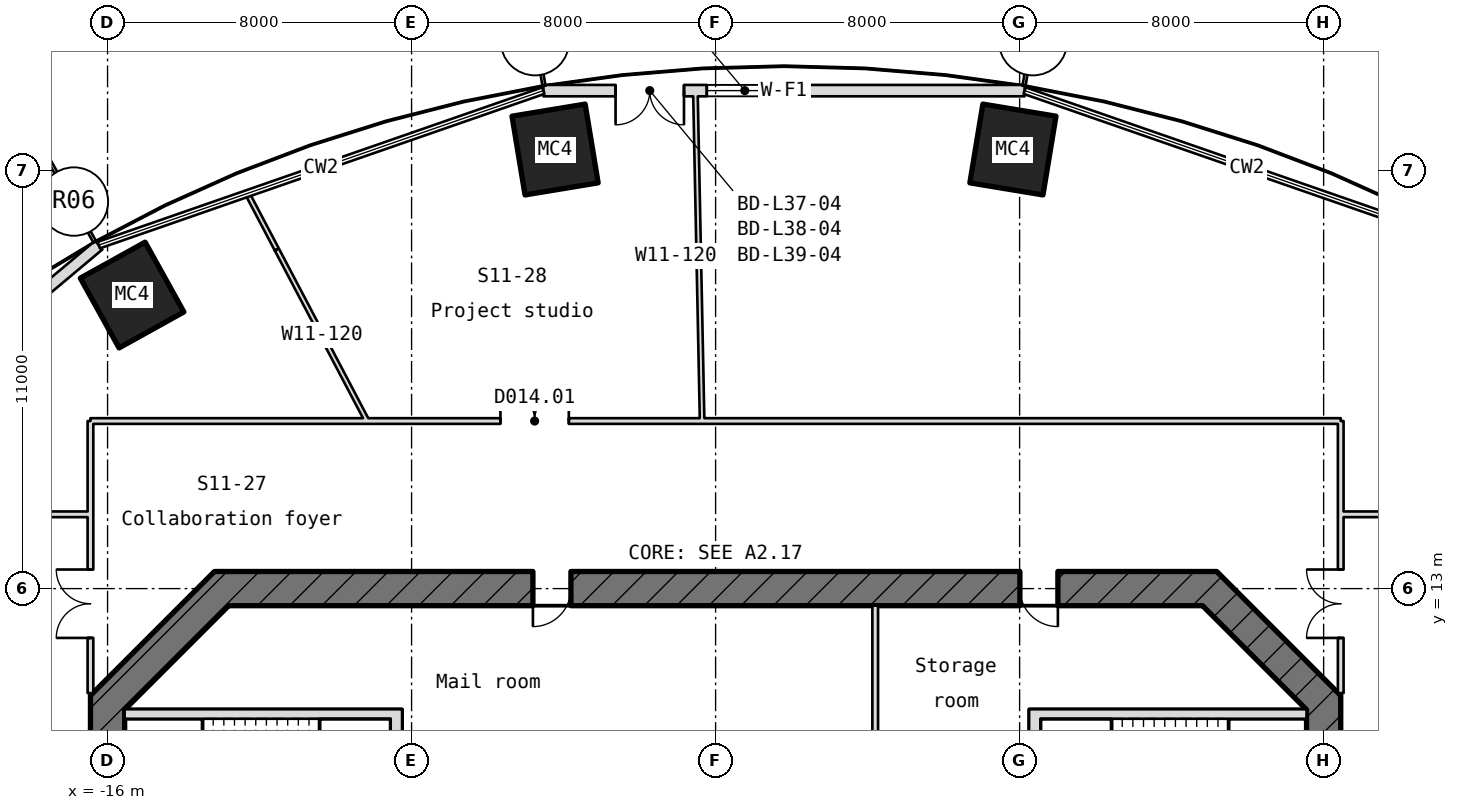
"""IFC4 building model, lengths in metres.
Left out: names, types, materials, properties, quantities, classifications, styles, units other than length and angle.
Written with IfcOpenShell. Run it as: python <this file> out.ifc"""

import sys

from ifc_helpers import new_model, si_unit, direction, frame, frame_2d, origin, origin_2d, place, context, subcontext, project, spatial, rectangle, hollow_rectangle, extrude, element, fill, save


model = new_model("IFC4")
c1 = context("Model", 3, precision=1e-05, world=origin(), true_north=direction((0.0, 1.0)))
c2 = subcontext(c1, "Body", "Model", "MODEL_VIEW")
j1 = project(units=[si_unit("LENGTHUNIT", "METRE"), si_unit("PLANEANGLEUNIT", "RADIAN")], contexts=[c1])
p1 = place(None, origin())
s1 = spatial("IfcSite", under=j1, at=p1, CompositionType="ELEMENT")
p2 = place(p1, origin())
s2 = spatial("IfcBuilding", under=s1, at=p2, CompositionType="ELEMENT")
p3 = place(p2, frame((0.0, 0.0, 173.5)))
s3 = spatial("IfcBuildingStorey", under=s2, at=p3, CompositionType="ELEMENT", Elevation=173.5)
for number, where, z_axis, x_axis in (
    (1, (7.824, 24.553, -0.18), (0.0, 0.0, 1.0), (0.987, -0.163, 0.0)),
    (2, (-4.224, 24.553, -0.18), (0.0, 0.0, 1.0), (0.987, 0.163, 0.0)),
    (3, (-15.354, 20.724, -0.18), (0.0, 0.0, 1.0), (0.874, 0.485, 0.0)),
):
    element("IfcColumn", number, at=place(p3, frame(where, z_axis=z_axis, x_axis=x_axis)), inside=s3, PredefinedType="COLUMN", context=c2, shape_type="SweptSolid", body=[
        extrude(hollow_rectangle(XDim=1.95, YDim=2.1, WallThickness=0.075, at=origin_2d()), origin(), (0.0, 0.0, 1.0), 4.15),
    ])
p4 = place(p3, frame((8.132, 26.103, 0.0), z_axis=(0.0, 0.0, 1.0), x_axis=(-1.0, 0.0, 0.0)))
e4 = element("IfcWall", 4, at=p4, inside=s3, PredefinedType="SOLIDWALL", context=c2, shape_type="SweptSolid", body=[
    extrude(rectangle(XDim=12.664, YDim=0.3, at=frame_2d((6.332, 0.0))), origin(), (0.0, 0.0, 1.0), 3.97),
])
p5 = place(p4, frame((8.964, 0.0, 0.0)))
e5 = element("IfcOpeningElement", 5, at=p5, cuts=e4, PredefinedType="OPENING", context=c2, shape_type="SweptSolid", body=[
    extrude(rectangle(XDim=1.8, YDim=2.4, at=frame_2d((0.9, 1.2))), frame((0.0, 0.16, 0.0), z_axis=(0.0, -1.0, 0.0), x_axis=(1.0, 0.0, 0.0)), (0.0, 0.0, 1.0), 0.32),
])
p6 = place(p4, frame((6.364, 0.0, 0.9)))
e6 = element("IfcOpeningElement", 6, at=p6, cuts=e4, PredefinedType="OPENING", context=c2, shape_type="SweptSolid", body=[
    extrude(rectangle(XDim=2.0, YDim=1.5, at=frame_2d((1.0, 0.75))), frame((0.0, 0.16, 0.0), z_axis=(0.0, -1.0, 0.0), x_axis=(1.0, 0.0, 0.0)), (0.0, 0.0, 1.0), 0.32),
])
p7 = place(p3, frame((-16.232, 22.038, 0.0), z_axis=(0.0, 0.0, 1.0), x_axis=(-0.766150735347, -0.642660914268, 0.0)))
e7 = element("IfcWall", 7, at=p7, inside=s3, PredefinedType="SOLIDWALL", context=c2, shape_type="SweptSolid", body=[
    extrude(rectangle(XDim=11.688, YDim=0.3, at=frame_2d((5.844, 0.0))), origin(), (0.0, 0.0, 1.0), 3.97),
])
p8 = place(p7, frame((7.988, 0.0, 0.0)))
e8 = element("IfcOpeningElement", 8, at=p8, cuts=e7, PredefinedType="OPENING", context=c2, shape_type="SweptSolid", body=[
    extrude(rectangle(XDim=1.8, YDim=2.4, at=frame_2d((0.9, 1.2))), frame((0.0, 0.16, 0.0), z_axis=(0.0, -1.0, 0.0), x_axis=(1.0, 0.0, 0.0)), (0.0, 0.0, 1.0), 0.32),
])
p9 = place(p7, frame((5.388, 0.0, 0.9)))
e9 = element("IfcOpeningElement", 9, at=p9, cuts=e7, PredefinedType="OPENING", context=c2, shape_type="SweptSolid", body=[
    extrude(rectangle(XDim=2.0, YDim=1.5, at=frame_2d((1.0, 0.75))), frame((0.0, 0.16, 0.0), z_axis=(0.0, -1.0, 0.0), x_axis=(1.0, 0.0, 0.0)), (0.0, 0.0, 1.0), 0.32),
])
p10 = place(p3, frame((16.0, -10.186, -0.18), z_axis=(0.0, 0.0, 1.0), x_axis=(0.0, 1.0, 0.0)))
e10 = element("IfcWall", 10, at=p10, inside=s3, PredefinedType="SHEAR", context=c2, shape_type="SweptSolid", body=[
    extrude(rectangle(XDim=20.373, YDim=0.9, at=frame_2d((10.186, 0.0))), origin(), (0.0, 0.0, 1.0), 4.15),
])
p11 = place(p10, frame((8.986, 0.0, 0.18)))
e11 = element("IfcOpeningElement", 11, at=p11, cuts=e10, PredefinedType="OPENING", context=c2, shape_type="SweptSolid", body=[
    extrude(rectangle(XDim=2.4, YDim=2.1, at=frame_2d((1.2, 1.05))), frame((0.0, 0.46, 0.0), z_axis=(0.0, -1.0, 0.0), x_axis=(1.0, 0.0, 0.0)), (0.0, 0.0, 1.0), 0.92),
])
p12 = place(p10, frame((13.586, 0.0, 0.18)))
e12 = element("IfcOpeningElement", 12, at=p12, cuts=e10, PredefinedType="OPENING", context=c2, shape_type="SweptSolid", body=[
    extrude(rectangle(XDim=1.2, YDim=2.1, at=frame_2d((0.6, 1.05))), frame((0.0, 0.46, 0.0), z_axis=(0.0, -1.0, 0.0), x_axis=(1.0, 0.0, 0.0)), (0.0, 0.0, 1.0), 0.92),
])
p13 = place(p10, frame((2.4, 0.0, 0.18)))
e13 = element("IfcOpeningElement", 13, at=p13, cuts=e10, PredefinedType="OPENING", context=c2, shape_type="SweptSolid", body=[
    extrude(rectangle(XDim=1.2, YDim=2.1, at=frame_2d((0.6, 1.05))), frame((0.0, 0.46, 0.0), z_axis=(0.0, -1.0, 0.0), x_axis=(1.0, 0.0, 0.0)), (0.0, 0.0, 1.0), 0.92),
])
p14 = place(p3, frame((16.132, 9.868, -0.18), z_axis=(0.0, 0.0, 1.0), x_axis=(-0.707106781187, 0.707106781187, 0.0)))
e14 = element("IfcWall", 14, at=p14, inside=s3, PredefinedType="SHEAR", context=c2, shape_type="SweptSolid", body=[
    extrude(rectangle(XDim=4.615, YDim=0.9, at=frame_2d((2.308, 0.0))), origin(), (0.0, 0.0, 1.0), 4.15),
])
p15 = place(p3, frame((13.186, 13.0, -0.18), z_axis=(0.0, 0.0, 1.0), x_axis=(-1.0, 0.0, 0.0)))
e15 = element("IfcWall", 15, at=p15, inside=s3, PredefinedType="SHEAR", context=c2, shape_type="SweptSolid", body=[
    extrude(rectangle(XDim=26.373, YDim=0.9, at=frame_2d((13.186, 0.0))), origin(), (0.0, 0.0, 1.0), 4.15),
])
p16 = place(p15, frame((16.993, 0.0, 0.18)))
e16 = element("IfcOpeningElement", 16, at=p16, cuts=e15, PredefinedType="OPENING", context=c2, shape_type="SweptSolid", body=[
    extrude(rectangle(XDim=1.0, YDim=2.1, at=frame_2d((0.5, 1.05))), frame((0.0, 0.46, 0.0), z_axis=(0.0, -1.0, 0.0), x_axis=(1.0, 0.0, 0.0)), (0.0, 0.0, 1.0), 0.92),
])
p17 = place(p15, frame((4.179, 0.0, 0.18)))
e17 = element("IfcOpeningElement", 17, at=p17, cuts=e15, PredefinedType="OPENING", context=c2, shape_type="SweptSolid", body=[
    extrude(rectangle(XDim=1.0, YDim=2.1, at=frame_2d((0.5, 1.05))), frame((0.0, 0.46, 0.0), z_axis=(0.0, -1.0, 0.0), x_axis=(1.0, 0.0, 0.0)), (0.0, 0.0, 1.0), 0.92),
])
p18 = place(p3, frame((-12.868, 13.132, -0.18), z_axis=(0.0, 0.0, 1.0), x_axis=(-0.707106781187, -0.707106781187, 0.0)))
e18 = element("IfcWall", 18, at=p18, inside=s3, PredefinedType="SHEAR", context=c2, shape_type="SweptSolid", body=[
    extrude(rectangle(XDim=4.615, YDim=0.9, at=frame_2d((2.308, 0.0))), origin(), (0.0, 0.0, 1.0), 4.15),
])
p19 = place(p3, frame((-16.0, 10.186, -0.18), z_axis=(0.0, 0.0, 1.0), x_axis=(0.0, -1.0, 0.0)))
e19 = element("IfcWall", 19, at=p19, inside=s3, PredefinedType="SHEAR", context=c2, shape_type="SweptSolid", body=[
    extrude(rectangle(XDim=20.373, YDim=0.9, at=frame_2d((10.186, 0.0))), origin(), (0.0, 0.0, 1.0), 4.15),
])
p20 = place(p19, frame((8.986, 0.0, 0.18)))
e20 = element("IfcOpeningElement", 20, at=p20, cuts=e19, PredefinedType="OPENING", context=c2, shape_type="SweptSolid", body=[
    extrude(rectangle(XDim=2.4, YDim=2.1, at=frame_2d((1.2, 1.05))), frame((0.0, 0.46, 0.0), z_axis=(0.0, -1.0, 0.0), x_axis=(1.0, 0.0, 0.0)), (0.0, 0.0, 1.0), 0.92),
])
p21 = place(p19, frame((5.586, 0.0, 0.18)))
e21 = element("IfcOpeningElement", 21, at=p21, cuts=e19, PredefinedType="OPENING", context=c2, shape_type="SweptSolid", body=[
    extrude(rectangle(XDim=1.2, YDim=2.1, at=frame_2d((0.6, 1.05))), frame((0.0, 0.46, 0.0), z_axis=(0.0, -1.0, 0.0), x_axis=(1.0, 0.0, 0.0)), (0.0, 0.0, 1.0), 0.92),
])
for number, where, z_axis, x_axis in (
    (22, (-15.55, 9.7, -0.18), (0.0, 0.0, 1.0), (1.0, 0.0, 0.0)),
    (23, (8.55, 9.7, -0.18), (0.0, 0.0, 1.0), (1.0, 0.0, 0.0)),
):
    element("IfcWall", number, at=place(p3, frame(where, z_axis=z_axis, x_axis=x_axis)), inside=s3, PredefinedType="SHEAR", context=c2, shape_type="SweptSolid", body=[
        extrude(rectangle(XDim=7.0, YDim=0.25, at=frame_2d((3.5, 0.0))), origin(), (0.0, 0.0, 1.0), 4.15),
    ])
p22 = place(p3, frame((-8.4, 8.35, -0.18), z_axis=(0.0, 0.0, 1.0), x_axis=(0.0, 1.0, 0.0)))
e24 = element("IfcWall", 24, at=p22, inside=s3, PredefinedType="SHEAR", context=c2, shape_type="SweptSolid", body=[
    extrude(rectangle(XDim=1.475, YDim=0.3, at=frame_2d((0.737, 0.0))), origin(), (0.0, 0.0, 1.0), 4.15),
])
p23 = place(p3, frame((4.2, 8.46, 0.0), z_axis=(0.0, 0.0, 1.0), x_axis=(0.0, 1.0, 0.0)))
e25 = element("IfcWall", 25, at=p23, inside=s3, PredefinedType="PARTITIONING", context=c2, shape_type="SweptSolid", body=[
    extrude(rectangle(XDim=4.09, YDim=0.15, at=frame_2d((2.045, 0.0))), origin(), (0.0, 0.0, 1.0), 3.97),
])
p24 = place(p3, frame((8.4, 8.35, -0.18), z_axis=(0.0, 0.0, 1.0), x_axis=(0.0, 1.0, 0.0)))
e26 = element("IfcWall", 26, at=p24, inside=s3, PredefinedType="SHEAR", context=c2, shape_type="SweptSolid", body=[
    extrude(rectangle(XDim=1.475, YDim=0.3, at=frame_2d((0.737, 0.0))), origin(), (0.0, 0.0, 1.0), 4.15),
])
p25 = place(p3, frame((-19.15, 14.955, 0.0), z_axis=(0.0, 0.0, 1.0), x_axis=(1.0, 0.0, 0.0)))
e27 = element("IfcWall", 27, at=p25, inside=s3, PredefinedType="PARTITIONING", context=c2, shape_type="SweptSolid", body=[
    extrude(rectangle(XDim=2.7, YDim=0.15, at=frame_2d((1.35, 0.0))), origin(), (0.0, 0.0, 1.0), 3.97),
])
p26 = place(p3, frame((-16.45, 10.25, 0.0), z_axis=(0.0, 0.0, 1.0), x_axis=(0.0, 1.0, 0.0)))
e28 = element("IfcWall", 28, at=p26, inside=s3, PredefinedType="PARTITIONING", context=c2, shape_type="SweptSolid", body=[
    extrude(rectangle(XDim=7.159, YDim=0.15, at=frame_2d((3.58, 0.0))), origin(), (0.0, 0.0, 1.0), 3.97),
])
p27 = place(p26, frame((1.452, 0.0, 0.0)))
e29 = element("IfcOpeningElement", 29, at=p27, cuts=e28, PredefinedType="OPENING", context=c2, shape_type="SweptSolid", body=[
    extrude(rectangle(XDim=1.8, YDim=2.1, at=frame_2d((0.9, 1.05))), frame((0.0, 0.085, 0.0), z_axis=(0.0, -1.0, 0.0), x_axis=(1.0, 0.0, 0.0)), (0.0, 0.0, 1.0), 0.17),
])
p28 = place(p3, frame((-16.45, 17.409, 0.0), z_axis=(0.0, 0.0, 1.0), x_axis=(1.0, 0.0, 0.0)))
e30 = element("IfcWall", 30, at=p28, inside=s3, PredefinedType="PARTITIONING", context=c2, shape_type="SweptSolid", body=[
    extrude(rectangle(XDim=32.9, YDim=0.15, at=frame_2d((16.45, 0.0))), origin(), (0.0, 0.0, 1.0), 3.97),
])
p29 = place(p28, frame((10.788, 0.0, 0.0)))
e31 = element("IfcOpeningElement", 31, at=p29, cuts=e30, PredefinedType="OPENING", context=c2, shape_type="SweptSolid", body=[
    extrude(rectangle(XDim=1.8, YDim=2.1, at=frame_2d((0.9, 1.05))), frame((0.0, 0.085, 0.0), z_axis=(0.0, -1.0, 0.0), x_axis=(1.0, 0.0, 0.0)), (0.0, 0.0, 1.0), 0.17),
])
p30 = place(p3, frame((-9.169, 17.409, 0.0), z_axis=(0.0, 0.0, 1.0), x_axis=(-0.466012759034, 0.88477799951, 0.0)))
e32 = element("IfcWall", 32, at=p30, inside=s3, PredefinedType="PARTITIONING", context=c2, shape_type="SweptSolid", body=[
    extrude(rectangle(XDim=5.1, YDim=0.12, at=frame_2d((2.55, 0.0))), origin(), (0.0, 0.0, 1.0), 3.503),
])
p31 = place(p3, frame((-11.546, 21.921, 0.0), z_axis=(0.0, 0.0, 1.0), x_axis=(-0.465981879328, 0.88479426317, 0.0)))
e33 = element("IfcWall", 33, at=p31, inside=s3, PredefinedType="PARTITIONING", context=c2, shape_type="SweptSolid", body=[
    extrude(rectangle(XDim=1.667, YDim=0.12, at=frame_2d((0.833, 0.0))), origin(), (0.0, 0.0, 1.0), 3.97),
])
p32 = place(p3, frame((-0.355, 17.409, 0.0), z_axis=(0.0, 0.0, 1.0), x_axis=(-0.020383295859, 0.999792239043, 0.0)))
e34 = element("IfcWall", 34, at=p32, inside=s3, PredefinedType="PARTITIONING", context=c2, shape_type="SweptSolid", body=[
    extrude(rectangle(XDim=8.696, YDim=0.12, at=frame_2d((4.348, 0.0))), origin(), (0.0, 0.0, 1.0), 3.97),
])
p33 = place(p3, frame((16.45, 10.25, 0.0), z_axis=(0.0, 0.0, 1.0), x_axis=(0.0, 1.0, 0.0)))
e35 = element("IfcWall", 35, at=p33, inside=s3, PredefinedType="PARTITIONING", context=c2, shape_type="SweptSolid", body=[
    extrude(rectangle(XDim=7.159, YDim=0.15, at=frame_2d((3.58, 0.0))), origin(), (0.0, 0.0, 1.0), 3.97),
])
p34 = place(p33, frame((1.452, 0.0, 0.0)))
e36 = element("IfcOpeningElement", 36, at=p34, cuts=e35, PredefinedType="OPENING", context=c2, shape_type="SweptSolid", body=[
    extrude(rectangle(XDim=1.8, YDim=2.1, at=frame_2d((0.9, 1.05))), frame((0.0, 0.085, 0.0), z_axis=(0.0, -1.0, 0.0), x_axis=(1.0, 0.0, 0.0)), (0.0, 0.0, 1.0), 0.17),
])
p35 = place(p3, frame((16.45, 14.955, 0.0), z_axis=(0.0, 0.0, 1.0), x_axis=(1.0, 0.0, 0.0)))
e37 = element("IfcWall", 37, at=p35, inside=s3, PredefinedType="PARTITIONING", context=c2, shape_type="SweptSolid", body=[
    extrude(rectangle(XDim=2.7, YDim=0.15, at=frame_2d((1.35, 0.0))), origin(), (0.0, 0.0, 1.0), 3.97),
])
p36 = place(p5, origin())
e38 = element("IfcDoor", 38, at=p36, inside=s3, OperationType="SINGLE_SWING_LEFT", PredefinedType="DOOR", context=c2, shape_type="SweptSolid", body=[
    extrude(rectangle(XDim=1.8, YDim=2.4, at=frame_2d((0.9, 1.2))), frame((0.0, 0.025, 0.0), z_axis=(0.0, -1.0, 0.0), x_axis=(1.0, 0.0, 0.0)), (0.0, 0.0, 1.0), 0.05),
])
fill(e5, e38)
p37 = place(p6, origin())
e39 = element("IfcWindow", 39, at=p37, inside=s3, PartitioningType="SINGLE_PANEL", PredefinedType="WINDOW", context=c2, shape_type="SweptSolid", body=[
    extrude(rectangle(XDim=2.0, YDim=1.5, at=frame_2d((1.0, 0.75))), frame((0.0, 0.03, 0.0), z_axis=(0.0, -1.0, 0.0), x_axis=(1.0, 0.0, 0.0)), (0.0, 0.0, 1.0), 0.06),
])
fill(e6, e39)
p38 = place(p16, origin())
e40 = element("IfcDoor", 40, at=p38, inside=s3, OperationType="SINGLE_SWING_RIGHT", PredefinedType="DOOR", context=c2, shape_type="SweptSolid", body=[
    extrude(rectangle(XDim=1.0, YDim=2.1, at=frame_2d((0.5, 1.05))), frame((0.0, 0.025, 0.0), z_axis=(0.0, -1.0, 0.0), x_axis=(1.0, 0.0, 0.0)), (0.0, 0.0, 1.0), 0.05),
])
fill(e16, e40)
p39 = place(p17, origin())
e41 = element("IfcDoor", 41, at=p39, inside=s3, OperationType="SINGLE_SWING_RIGHT", PredefinedType="DOOR", context=c2, shape_type="SweptSolid", body=[
    extrude(rectangle(XDim=1.0, YDim=2.1, at=frame_2d((0.5, 1.05))), frame((0.0, 0.025, 0.0), z_axis=(0.0, -1.0, 0.0), x_axis=(1.0, 0.0, 0.0)), (0.0, 0.0, 1.0), 0.05),
])
fill(e17, e41)
p40 = place(p29, origin())
e42 = element("IfcDoor", 42, at=p40, inside=s3, OperationType="DOUBLE_DOOR_SINGLE_SWING", PredefinedType="DOOR", context=c2, shape_type="SweptSolid", body=[
    extrude(rectangle(XDim=1.8, YDim=2.1, at=frame_2d((0.9, 1.05))), frame((0.0, 0.025, 0.0), z_axis=(0.0, -1.0, 0.0), x_axis=(1.0, 0.0, 0.0)), (0.0, 0.0, 1.0), 0.05),
])
fill(e31, e42)
p41 = place(p27, origin())
e43 = element("IfcDoor", 43, at=p41, inside=s3, OperationType="DOUBLE_DOOR_SINGLE_SWING", PredefinedType="DOOR", context=c2, shape_type="SweptSolid", body=[
    extrude(rectangle(XDim=1.8, YDim=2.1, at=frame_2d((0.9, 1.05))), frame((0.0, 0.025, 0.0), z_axis=(0.0, -1.0, 0.0), x_axis=(1.0, 0.0, 0.0)), (0.0, 0.0, 1.0), 0.05),
])
fill(e29, e43)
p42 = place(p34, origin())
e44 = element("IfcDoor", 44, at=p42, inside=s3, OperationType="DOUBLE_DOOR_SINGLE_SWING", PredefinedType="DOOR", context=c2, shape_type="SweptSolid", body=[
    extrude(rectangle(XDim=1.8, YDim=2.1, at=frame_2d((0.9, 1.05))), frame((0.0, 0.025, 0.0), z_axis=(0.0, -1.0, 0.0), x_axis=(1.0, 0.0, 0.0)), (0.0, 0.0, 1.0), 0.05),
])
fill(e36, e44)
save(model, sys.argv[1])
